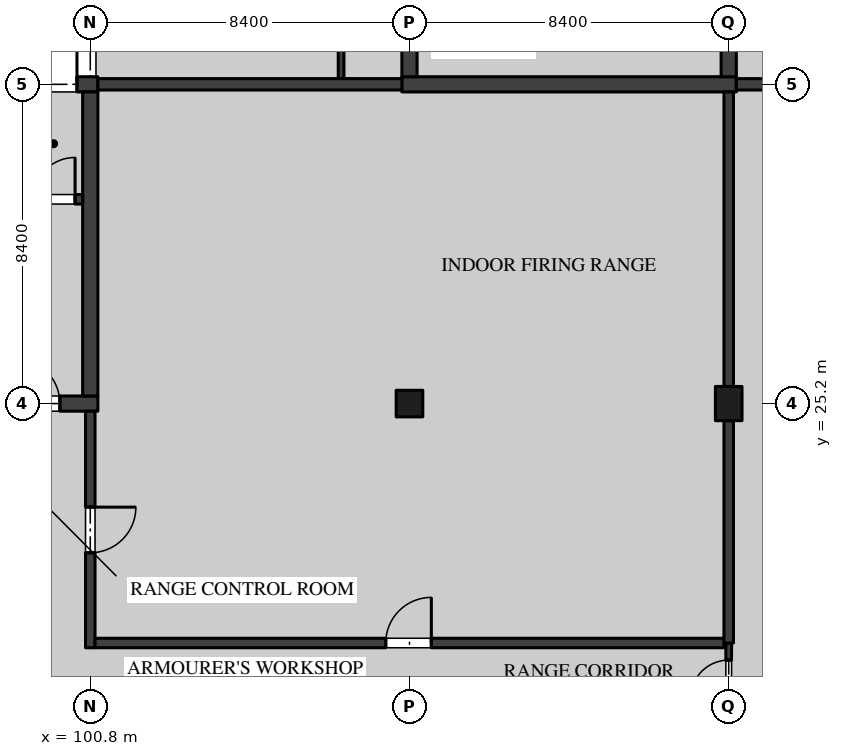
"""IFC4 building model, lengths in metres.
Left out: names, types, materials, properties, quantities, classifications, styles, units other than length and angle.
Written with IfcOpenShell. Run it as: python <this file> out.ifc"""

import sys

from ifc_helpers import new_model, si_unit, direction, frame, frame_2d, origin, origin_2d, place, context, subcontext, project, spatial, rectangle, extrude, element, fill, save


model = new_model("IFC4")
c1 = context("Model", 3, precision=1e-05, world=origin(), true_north=direction((0.0, 1.0)))
c2 = subcontext(c1, "Body", "Model", "MODEL_VIEW")
j1 = project(units=[si_unit("LENGTHUNIT", "METRE"), si_unit("PLANEANGLEUNIT", "RADIAN")], contexts=[c1])
p1 = place(None, origin())
s1 = spatial("IfcSite", under=j1, at=p1, CompositionType="ELEMENT")
p2 = place(p1, origin())
s2 = spatial("IfcBuilding", under=s1, at=p2, CompositionType="ELEMENT")
p3 = place(p2, origin())
s3 = spatial("IfcBuildingStorey", under=s2, at=p3, CompositionType="ELEMENT", Elevation=0.0)
p4 = place(p3, frame((109.2, 25.2, 0.0), z_axis=(0.0, 0.0, 1.0), x_axis=(1.0, 0.0, 0.0)))
e1 = element("IfcColumn", 1, at=p4, inside=s3, PredefinedType="COLUMN", context=c2, shape_type="SweptSolid", body=[
    extrude(rectangle(XDim=0.7, YDim=0.7, at=origin_2d()), origin(), (0.0, 0.0, 1.0), 5.05),
])
p5 = place(p3, frame((117.6, 25.2, 0.0), z_axis=(0.0, 0.0, 1.0), x_axis=(1.0, 0.0, 0.0)))
e2 = element("IfcColumn", 2, at=p5, inside=s3, PredefinedType="COLUMN", context=c2, shape_type="SweptSolid", body=[
    extrude(rectangle(XDim=0.7, YDim=0.9, at=origin_2d()), origin(), (0.0, 0.0, 1.0), 5.05),
])
p6 = place(p3, frame((92.2, 25.2, 0.0), z_axis=(0.0, 0.0, 1.0), x_axis=(1.0, 0.0, 0.0)))
e3 = element("IfcWall", 3, at=p6, inside=s3, PredefinedType="SHEAR", context=c2, shape_type="SweptSolid", body=[
    extrude(rectangle(XDim=8.8, YDim=0.4, at=frame_2d((4.4, 0.0))), origin(), (0.0, 0.0, 1.0), 5.05),
])
p7 = place(p6, frame((6.6, 0.0, 0.0)))
e4 = element("IfcOpeningElement", 4, at=p7, cuts=e3, PredefinedType="OPENING", context=c2, shape_type="SweptSolid", body=[
    extrude(rectangle(XDim=1.2, YDim=2.1, at=frame_2d((0.6, 1.05))), frame((0.0, 0.21, 0.0), z_axis=(0.0, -1.0, 0.0), x_axis=(1.0, 0.0, 0.0)), (0.0, 0.0, 1.0), 0.42),
])
p8 = place(p3, frame((92.2, 33.6, 0.0), z_axis=(0.0, 0.0, 1.0), x_axis=(1.0, 0.0, 0.0)))
e5 = element("IfcWall", 5, at=p8, inside=s3, PredefinedType="SHEAR", context=c2, shape_type="SweptSolid", body=[
    extrude(rectangle(XDim=8.8, YDim=0.4, at=frame_2d((4.4, 0.0))), origin(), (0.0, 0.0, 1.0), 5.05),
])
p9 = place(p8, frame((7.05, 0.0, 0.0)))
e6 = element("IfcOpeningElement", 6, at=p9, cuts=e5, PredefinedType="OPENING", context=c2, shape_type="SweptSolid", body=[
    extrude(rectangle(XDim=1.2, YDim=2.1, at=frame_2d((0.6, 1.05))), frame((0.0, 0.21, 0.0), z_axis=(0.0, -1.0, 0.0), x_axis=(1.0, 0.0, 0.0)), (0.0, 0.0, 1.0), 0.42),
])
p10 = place(p3, frame((100.8, 25.4, 0.0), z_axis=(0.0, 0.0, 1.0), x_axis=(0.0, 1.0, 0.0)))
e7 = element("IfcWall", 7, at=p10, inside=s3, PredefinedType="SHEAR", context=c2, shape_type="SweptSolid", body=[
    extrude(rectangle(XDim=8.0, YDim=0.4, at=frame_2d((4.0, 0.0))), origin(), (0.0, 0.0, 1.0), 5.05),
])
p11 = place(p3, frame((100.6, 30.575, 0.0), z_axis=(0.0, 0.0, 1.0), x_axis=(-1.0, 0.0, 0.0)))
e8 = element("IfcWall", 8, at=p11, inside=s3, PredefinedType="SOLIDWALL", context=c2, shape_type="SweptSolid", body=[
    extrude(rectangle(XDim=8.0, YDim=0.25, at=frame_2d((4.0, 0.0))), origin(), (0.0, 0.0, 1.0), 5.05),
])
p12 = place(p11, frame((0.2, 0.0, 0.0)))
e9 = element("IfcOpeningElement", 9, at=p12, cuts=e8, PredefinedType="OPENING", context=c2, shape_type="SweptSolid", body=[
    extrude(rectangle(XDim=1.1, YDim=2.1, at=frame_2d((0.55, 1.05))), frame((0.0, 0.135, 0.0), z_axis=(0.0, -1.0, 0.0), x_axis=(1.0, 0.0, 0.0)), (0.0, 0.0, 1.0), 0.27),
])
p13 = place(p3, frame((109.0, 33.6, 0.0), z_axis=(0.0, 0.0, 1.0), x_axis=(1.0, 0.0, 0.0)))
e10 = element("IfcWall", 10, at=p13, inside=s3, PredefinedType="SHEAR", context=c2, shape_type="SweptSolid", body=[
    extrude(rectangle(XDim=8.8, YDim=0.4, at=frame_2d((4.4, 0.0))), origin(), (0.0, 0.0, 1.0), 5.05),
])
p14 = place(p3, frame((109.2, 33.8, 0.0), z_axis=(0.0, 0.0, 1.0), x_axis=(0.0, 1.0, 0.0)))
e11 = element("IfcWall", 11, at=p14, inside=s3, PredefinedType="SHEAR", context=c2, shape_type="SweptSolid", body=[
    extrude(rectangle(XDim=8.0, YDim=0.4, at=frame_2d((4.0, 0.0))), origin(), (0.0, 0.0, 1.0), 5.05),
])
p15 = place(p14, frame((3.875, 0.0, 0.0)))
e12 = element("IfcOpeningElement", 12, at=p15, cuts=e11, PredefinedType="OPENING", context=c2, shape_type="SweptSolid", body=[
    extrude(rectangle(XDim=1.2, YDim=2.1, at=frame_2d((0.6, 1.05))), frame((0.0, 0.21, 0.0), z_axis=(0.0, -1.0, 0.0), x_axis=(1.0, 0.0, 0.0)), (0.0, 0.0, 1.0), 0.42),
])
p16 = place(p3, frame((117.6, 33.8, 0.0), z_axis=(0.0, 0.0, 1.0), x_axis=(0.0, 1.0, 0.0)))
e13 = element("IfcWall", 13, at=p16, inside=s3, PredefinedType="SHEAR", context=c2, shape_type="SweptSolid", body=[
    extrude(rectangle(XDim=8.0, YDim=0.4, at=frame_2d((4.0, 0.0))), origin(), (0.0, 0.0, 1.0), 5.05),
])
p17 = place(p16, frame((3.875, 0.0, 0.0)))
e14 = element("IfcOpeningElement", 14, at=p17, cuts=e13, PredefinedType="OPENING", context=c2, shape_type="SweptSolid", body=[
    extrude(rectangle(XDim=1.2, YDim=2.1, at=frame_2d((0.6, 1.05))), frame((0.0, 0.21, 0.0), z_axis=(0.0, -1.0, 0.0), x_axis=(1.0, 0.0, 0.0)), (0.0, 0.0, 1.0), 0.42),
])
p18 = place(p3, frame((117.6, 17.0, 0.0), z_axis=(0.0, 0.0, 1.0), x_axis=(0.0, 1.0, 0.0)))
e15 = element("IfcWall", 15, at=p18, inside=s3, PredefinedType="PARTITIONING", context=c2, shape_type="SweptSolid", body=[
    extrude(rectangle(XDim=1.9, YDim=0.15, at=frame_2d((0.95, 0.0))), origin(), (0.0, 0.0, 1.0), 8.375),
])
p19 = place(p18, frame((0.45, 0.0, 0.0)))
e16 = element("IfcOpeningElement", 16, at=p19, cuts=e15, PredefinedType="OPENING", context=c2, shape_type="SweptSolid", body=[
    extrude(rectangle(XDim=1.0, YDim=2.1, at=frame_2d((0.5, 1.05))), frame((0.0, 0.085, 0.0), z_axis=(0.0, -1.0, 0.0), x_axis=(1.0, 0.0, 0.0)), (0.0, 0.0, 1.0), 0.17),
])
p20 = place(p3, frame((100.8, 18.775, 0.0), z_axis=(0.0, 0.0, 1.0), x_axis=(0.0, 1.0, 0.0)))
e17 = element("IfcWall", 17, at=p20, inside=s3, PredefinedType="PARTITIONING", context=c2, shape_type="SweptSolid", body=[
    extrude(rectangle(XDim=6.225, YDim=0.25, at=frame_2d((3.113, 0.0))), origin(), (0.0, 0.0, 1.0), 5.05),
])
p21 = place(p20, frame((2.5, 0.0, 0.0)))
e18 = element("IfcOpeningElement", 18, at=p21, cuts=e17, PredefinedType="OPENING", context=c2, shape_type="SweptSolid", body=[
    extrude(rectangle(XDim=1.2, YDim=2.1, at=frame_2d((0.6, 1.05))), frame((0.0, 0.135, 0.0), z_axis=(0.0, -1.0, 0.0), x_axis=(1.0, 0.0, 0.0)), (0.0, 0.0, 1.0), 0.27),
])
p22 = place(p3, frame((100.925, 18.9, 0.0), z_axis=(0.0, 0.0, 1.0), x_axis=(1.0, 0.0, 0.0)))
e19 = element("IfcWall", 19, at=p22, inside=s3, PredefinedType="PARTITIONING", context=c2, shape_type="SweptSolid", body=[
    extrude(rectangle(XDim=16.55, YDim=0.25, at=frame_2d((8.275, 0.0))), origin(), (0.0, 0.0, 1.0), 5.05),
])
p23 = place(p22, frame((7.65, 0.0, 0.0)))
e20 = element("IfcOpeningElement", 20, at=p23, cuts=e19, PredefinedType="OPENING", context=c2, shape_type="SweptSolid", body=[
    extrude(rectangle(XDim=1.2, YDim=2.1, at=frame_2d((0.6, 1.05))), frame((0.0, 0.135, 0.0), z_axis=(0.0, -1.0, 0.0), x_axis=(1.0, 0.0, 0.0)), (0.0, 0.0, 1.0), 0.27),
])
p24 = place(p3, frame((117.6, 18.9, 0.0), z_axis=(0.0, 0.0, 1.0), x_axis=(0.0, 1.0, 0.0)))
e21 = element("IfcWall", 21, at=p24, inside=s3, PredefinedType="PARTITIONING", context=c2, shape_type="SweptSolid", body=[
    extrude(rectangle(XDim=5.85, YDim=0.25, at=frame_2d((2.925, 0.0))), origin(), (0.0, 0.0, 1.0), 8.375),
])
p25 = place(p3, frame((117.6, 25.65, 0.0), z_axis=(0.0, 0.0, 1.0), x_axis=(0.0, 1.0, 0.0)))
e22 = element("IfcWall", 22, at=p25, inside=s3, PredefinedType="PARTITIONING", context=c2, shape_type="SweptSolid", body=[
    extrude(rectangle(XDim=7.75, YDim=0.25, at=frame_2d((3.875, 0.0))), origin(), (0.0, 0.0, 1.0), 8.375),
])
p26 = place(p3, frame((107.4, 33.75, 0.0), z_axis=(0.0, 0.0, 1.0), x_axis=(0.0, 1.0, 0.0)))
e23 = element("IfcWall", 23, at=p26, inside=s3, PredefinedType="PARTITIONING", context=c2, shape_type="SweptSolid", body=[
    extrude(rectangle(XDim=4.05, YDim=0.15, at=frame_2d((2.025, 0.0))), origin(), (0.0, 0.0, 1.0), 5.05),
])
p27 = place(p26, frame((1.55, 0.0, 0.0)))
e24 = element("IfcOpeningElement", 24, at=p27, cuts=e23, PredefinedType="OPENING", context=c2, shape_type="SweptSolid", body=[
    extrude(rectangle(XDim=0.9, YDim=2.1, at=frame_2d((0.45, 1.05))), frame((0.0, 0.085, 0.0), z_axis=(0.0, -1.0, 0.0), x_axis=(1.0, 0.0, 0.0)), (0.0, 0.0, 1.0), 0.17),
])
p28 = place(p3, frame((125.55, 33.6, 0.0), z_axis=(0.0, 0.0, 1.0), x_axis=(-1.0, 0.0, 0.0)))
e25 = element("IfcWall", 25, at=p28, inside=s3, PredefinedType="SOLIDWALL", context=c2, shape_type="SweptSolid", body=[
    extrude(rectangle(XDim=7.75, YDim=0.3, at=frame_2d((3.875, 0.0))), origin(), (0.0, 0.0, 1.0), 5.4),
])
p29 = place(p3, frame((109.0, 33.6, 0.0), z_axis=(0.0, 0.0, 1.0), x_axis=(-1.0, 0.0, 0.0)))
e26 = element("IfcWall", 26, at=p29, inside=s3, PredefinedType="SOLIDWALL", context=c2, shape_type="SweptSolid", body=[
    extrude(rectangle(XDim=8.0, YDim=0.3, at=frame_2d((4.0, 0.0))), origin(), (0.0, 0.0, 1.0), 5.05),
])
p30 = place(p7, origin())
e27 = element("IfcDoor", 27, at=p30, inside=s3, OperationType="SINGLE_SWING_RIGHT", PredefinedType="DOOR", context=c2, shape_type="SweptSolid", body=[
    extrude(rectangle(XDim=1.2, YDim=2.1, at=frame_2d((0.6, 1.05))), frame((0.0, 0.035, 0.0), z_axis=(0.0, -1.0, 0.0), x_axis=(1.0, 0.0, 0.0)), (0.0, 0.0, 1.0), 0.07),
])
fill(e4, e27)
p31 = place(p12, frame((1.1, 0.0, 0.0), z_axis=(0.0, 0.0, 1.0), x_axis=(-1.0, 0.0, 0.0)))
e28 = element("IfcDoor", 28, at=p31, inside=s3, OperationType="SINGLE_SWING_LEFT", PredefinedType="DOOR", context=c2, shape_type="SweptSolid", body=[
    extrude(rectangle(XDim=1.1, YDim=2.1, at=frame_2d((0.55, 1.05))), frame((0.0, 0.035, 0.0), z_axis=(0.0, -1.0, 0.0), x_axis=(1.0, 0.0, 0.0)), (0.0, 0.0, 1.0), 0.07),
])
fill(e9, e28)
p32 = place(p9, origin())
e29 = element("IfcDoor", 29, at=p32, inside=s3, OperationType="SINGLE_SWING_LEFT", PredefinedType="DOOR", context=c2, shape_type="SweptSolid", body=[
    extrude(rectangle(XDim=1.2, YDim=2.1, at=frame_2d((0.6, 1.05))), frame((0.0, 0.035, 0.0), z_axis=(0.0, -1.0, 0.0), x_axis=(1.0, 0.0, 0.0)), (0.0, 0.0, 1.0), 0.07),
])
fill(e6, e29)
p33 = place(p19, origin())
e30 = element("IfcDoor", 30, at=p33, inside=s3, OperationType="SINGLE_SWING_RIGHT", PredefinedType="DOOR", context=c2, shape_type="SweptSolid", body=[
    extrude(rectangle(XDim=1.0, YDim=2.1, at=frame_2d((0.5, 1.05))), frame((0.0, 0.025, 0.0), z_axis=(0.0, -1.0, 0.0), x_axis=(1.0, 0.0, 0.0)), (0.0, 0.0, 1.0), 0.05),
])
fill(e16, e30)
p34 = place(p21, frame((1.2, 0.0, 0.0), z_axis=(0.0, 0.0, 1.0), x_axis=(-1.0, 0.0, 0.0)))
e31 = element("IfcDoor", 31, at=p34, inside=s3, OperationType="SINGLE_SWING_RIGHT", PredefinedType="DOOR", context=c2, shape_type="SweptSolid", body=[
    extrude(rectangle(XDim=1.2, YDim=2.1, at=frame_2d((0.6, 1.05))), frame((0.0, 0.045, 0.0), z_axis=(0.0, -1.0, 0.0), x_axis=(1.0, 0.0, 0.0)), (0.0, 0.0, 1.0), 0.09),
])
fill(e18, e31)
p35 = place(p23, origin())
e32 = element("IfcDoor", 32, at=p35, inside=s3, OperationType="SINGLE_SWING_LEFT", PredefinedType="DOOR", context=c2, shape_type="SweptSolid", body=[
    extrude(rectangle(XDim=1.2, YDim=2.1, at=frame_2d((0.6, 1.05))), frame((0.0, 0.045, 0.0), z_axis=(0.0, -1.0, 0.0), x_axis=(1.0, 0.0, 0.0)), (0.0, 0.0, 1.0), 0.09),
])
fill(e20, e32)
save(model, sys.argv[1])
